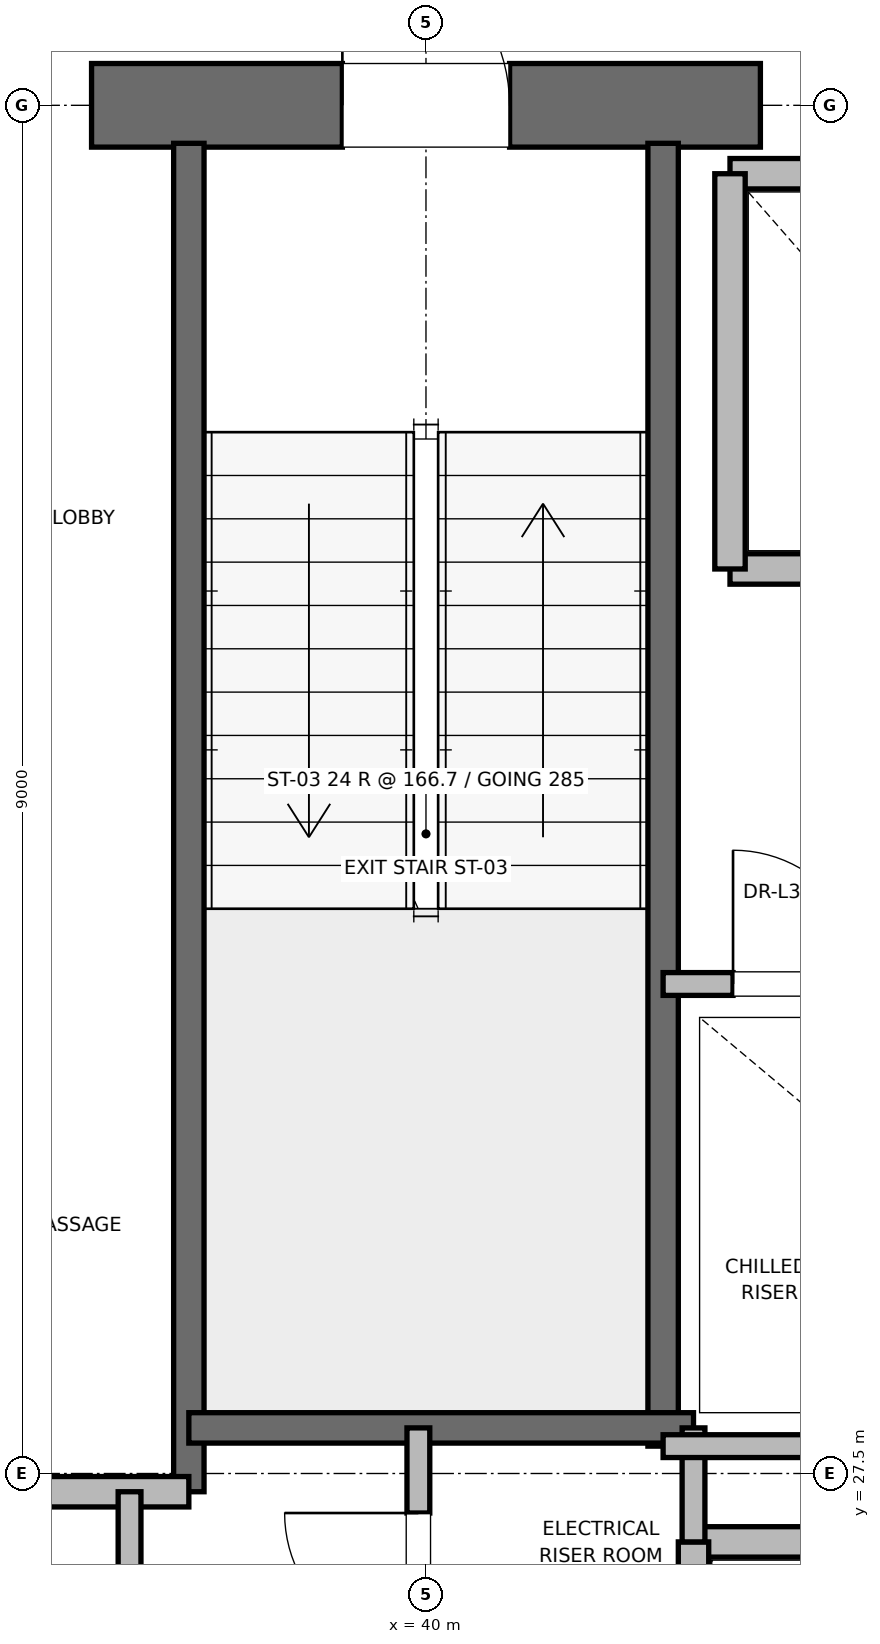
"""IFC4 building model, lengths in metres.
Left out: names, types, materials, properties, quantities, classifications, styles, units other than length and angle.
Written with IfcOpenShell. Run it as: python <this file> out.ifc"""

import sys

from ifc_helpers import new_model, si_unit, direction, frame, frame_2d, origin, place, context, subcontext, project, spatial, rectangle, extrude, element, fill, save


model = new_model("IFC4")
c1 = context("Model", 3, precision=1e-05, world=origin(), true_north=direction((0.0, 1.0)))
c2 = subcontext(c1, "Body", "Model", "MODEL_VIEW")
j1 = project(units=[si_unit("LENGTHUNIT", "METRE"), si_unit("PLANEANGLEUNIT", "RADIAN")], contexts=[c1])
p1 = place(None, origin())
s1 = spatial("IfcSite", under=j1, at=p1, CompositionType="ELEMENT")
p2 = place(p1, origin())
s2 = spatial("IfcBuilding", under=s1, at=p2, CompositionType="ELEMENT")
p3 = place(p2, frame((0.0, 0.0, 156.4)))
s3 = spatial("IfcBuildingStorey", under=s2, at=p3, CompositionType="ELEMENT", Elevation=156.4)
p4 = place(p3, frame((37.8, 36.5, 0.0), z_axis=(0.0, 0.0, 1.0), x_axis=(1.0, 0.0, 0.0)))
e1 = element("IfcWall", 1, at=p4, inside=s3, PredefinedType="SHEAR", context=c2, shape_type="SweptSolid", body=[
    extrude(rectangle(XDim=4.4, YDim=0.55, at=frame_2d((2.2, 0.0))), origin(), (0.0, 0.0, 1.0), 3.775),
])
p5 = place(p4, frame((1.65, 0.0, 0.0)))
e2 = element("IfcOpeningElement", 2, at=p5, cuts=e1, PredefinedType="OPENING", context=c2, shape_type="SweptSolid", body=[
    extrude(rectangle(XDim=1.1, YDim=2.15, at=frame_2d((0.55, 1.075))), frame((0.0, 0.275, 0.0), z_axis=(0.0, -1.0, 0.0), x_axis=(1.0, 0.0, 0.0)), (0.0, 0.0, 1.0), 0.55),
])
p6 = place(p3, frame((38.44, 27.38, 0.0), z_axis=(0.0, 0.0, 1.0), x_axis=(0.0, 1.0, 0.0)))
e3 = element("IfcWall", 3, at=p6, inside=s3, PredefinedType="SOLIDWALL", context=c2, shape_type="SweptSolid", body=[
    extrude(rectangle(XDim=8.87, YDim=0.2, at=frame_2d((4.435, 0.0))), origin(), (0.0, 0.0, 1.0), 3.775),
])
p7 = place(p3, frame((41.56, 27.68, 0.0), z_axis=(0.0, 0.0, 1.0), x_axis=(0.0, 1.0, 0.0)))
e4 = element("IfcWall", 4, at=p7, inside=s3, PredefinedType="SOLIDWALL", context=c2, shape_type="SweptSolid", body=[
    extrude(rectangle(XDim=8.57, YDim=0.2, at=frame_2d((4.285, 0.0))), origin(), (0.0, 0.0, 1.0), 3.775),
])
p8 = place(p3, frame((38.44, 27.8, 0.0), z_axis=(0.0, 0.0, 1.0), x_axis=(1.0, 0.0, 0.0)))
e5 = element("IfcWall", 5, at=p8, inside=s3, PredefinedType="SOLIDWALL", context=c2, shape_type="SweptSolid", body=[
    extrude(rectangle(XDim=3.32, YDim=0.2, at=frame_2d((1.66, 0.0))), origin(), (0.0, 0.0, 1.0), 3.775),
])
p9 = place(p3, frame((32.82, 27.38, 0.0), z_axis=(0.0, 0.0, 1.0), x_axis=(1.0, 0.0, 0.0)))
e6 = element("IfcWall", 6, at=p9, inside=s3, PredefinedType="PARTITIONING", context=c2, shape_type="SweptSolid", body=[
    extrude(rectangle(XDim=5.62, YDim=0.2, at=frame_2d((2.81, 0.0))), origin(), (0.0, 0.0, 1.0), 3.775),
])
p10 = place(p3, frame((43.44, 27.05, 0.0), z_axis=(0.0, 0.0, 1.0), x_axis=(-1.0, 0.0, 0.0)))
e7 = element("IfcWall", 7, at=p10, inside=s3, PredefinedType="SOLIDWALL", context=c2, shape_type="SweptSolid", body=[
    extrude(rectangle(XDim=1.68, YDim=0.2, at=frame_2d((0.84, 0.0))), origin(), (0.0, 0.0, 1.0), 3.775),
])
p11 = place(p3, frame((41.76, 27.05, 0.0), z_axis=(0.0, 0.0, 1.0), x_axis=(0.0, -1.0, 0.0)))
e8 = element("IfcWall", 8, at=p11, inside=s3, PredefinedType="SOLIDWALL", context=c2, shape_type="SweptSolid", body=[
    extrude(rectangle(XDim=2.6, YDim=0.2, at=frame_2d((1.3, 0.0))), origin(), (0.0, 0.0, 1.0), 3.775),
])
p12 = place(p3, frame((42.0, 33.45, 0.0), z_axis=(0.0, 0.0, 1.0), x_axis=(1.0, 0.0, 0.0)))
e9 = element("IfcWall", 9, at=p12, inside=s3, PredefinedType="SOLIDWALL", context=c2, shape_type="SweptSolid", body=[
    extrude(rectangle(XDim=2.3, YDim=0.2, at=frame_2d((1.15, 0.0))), origin(), (0.0, 0.0, 1.0), 3.775),
])
p13 = place(p3, frame((44.3, 36.05, 0.0), z_axis=(0.0, 0.0, 1.0), x_axis=(-1.0, 0.0, 0.0)))
e10 = element("IfcWall", 10, at=p13, inside=s3, PredefinedType="SOLIDWALL", context=c2, shape_type="SweptSolid", body=[
    extrude(rectangle(XDim=2.3, YDim=0.2, at=frame_2d((1.15, 0.0))), origin(), (0.0, 0.0, 1.0), 2.755),
])
p14 = place(p3, frame((42.0, 36.05, 0.0), z_axis=(0.0, 0.0, 1.0), x_axis=(0.0, -1.0, 0.0)))
e11 = element("IfcWall", 11, at=p14, inside=s3, PredefinedType="SOLIDWALL", context=c2, shape_type="SweptSolid", body=[
    extrude(rectangle(XDim=2.6, YDim=0.2, at=frame_2d((1.3, 0.0))), origin(), (0.0, 0.0, 1.0), 2.755),
])
p15 = place(p3, frame((41.76, 27.05, 0.0), z_axis=(0.0, 0.0, 1.0), x_axis=(0.0, 1.0, 0.0)))
e12 = element("IfcWall", 12, at=p15, inside=s3, PredefinedType="PARTITIONING", context=c2, shape_type="SweptSolid", body=[
    extrude(rectangle(XDim=0.75, YDim=0.15, at=frame_2d((0.375, 0.0))), origin(), (0.0, 0.0, 1.0), 2.85),
])
p16 = place(p3, frame((39.95, 25.8, 0.0), z_axis=(0.0, 0.0, 1.0), x_axis=(0.0, 1.0, 0.0)))
e13 = element("IfcWall", 13, at=p16, inside=s3, PredefinedType="PARTITIONING", context=c2, shape_type="SweptSolid", body=[
    extrude(rectangle(XDim=2.0, YDim=0.15, at=frame_2d((1.0, 0.0))), origin(), (0.0, 0.0, 1.0), 2.85),
])
p17 = place(p16, frame((0.56, 0.0, 0.0)))
e14 = element("IfcOpeningElement", 14, at=p17, cuts=e13, PredefinedType="OPENING", context=c2, shape_type="SweptSolid", body=[
    extrude(rectangle(XDim=0.88, YDim=2.1, at=frame_2d((0.44, 1.05))), frame((0.0, 0.075, 0.0), z_axis=(0.0, -1.0, 0.0), x_axis=(1.0, 0.0, 0.0)), (0.0, 0.0, 1.0), 0.15),
])
p18 = place(p3, frame((38.05, 23.06, 0.0), z_axis=(0.0, 0.0, 1.0), x_axis=(0.0, 1.0, 0.0)))
e15 = element("IfcWall", 15, at=p18, inside=s3, PredefinedType="PARTITIONING", context=c2, shape_type="SweptSolid", body=[
    extrude(rectangle(XDim=4.32, YDim=0.15, at=frame_2d((2.16, 0.0))), origin(), (0.0, 0.0, 1.0), 2.85),
])
p19 = place(p18, frame((1.66, 0.0, 0.0)))
e16 = element("IfcOpeningElement", 16, at=p19, cuts=e15, PredefinedType="OPENING", context=c2, shape_type="SweptSolid", body=[
    extrude(rectangle(XDim=1.0, YDim=2.15, at=frame_2d((0.5, 1.075))), frame((0.0, 0.075, 0.0), z_axis=(0.0, -1.0, 0.0), x_axis=(1.0, 0.0, 0.0)), (0.0, 0.0, 1.0), 0.15),
])
p20 = place(p3, frame((41.56, 27.68, 0.0), z_axis=(0.0, 0.0, 1.0), x_axis=(1.0, 0.0, 0.0)))
e17 = element("IfcWall", 17, at=p20, inside=s3, PredefinedType="PARTITIONING", context=c2, shape_type="SweptSolid", body=[
    extrude(rectangle(XDim=3.59, YDim=0.15, at=frame_2d((1.795, 0.0))), origin(), (0.0, 0.0, 1.0), 2.85),
])
p21 = place(p3, frame((41.56, 30.72, 0.0), z_axis=(0.0, 0.0, 1.0), x_axis=(1.0, 0.0, 0.0)))
e18 = element("IfcWall", 18, at=p21, inside=s3, PredefinedType="PARTITIONING", context=c2, shape_type="SweptSolid", body=[
    extrude(rectangle(XDim=1.8, YDim=0.15, at=frame_2d((0.9, 0.0))), origin(), (0.0, 0.0, 1.0), 2.85),
])
p22 = place(p21, frame((0.46, 0.0, 0.0)))
e19 = element("IfcOpeningElement", 19, at=p22, cuts=e18, PredefinedType="OPENING", context=c2, shape_type="SweptSolid", body=[
    extrude(rectangle(XDim=0.88, YDim=2.1, at=frame_2d((0.44, 1.05))), frame((0.0, 0.075, 0.0), z_axis=(0.0, -1.0, 0.0), x_axis=(1.0, 0.0, 0.0)), (0.0, 0.0, 1.0), 0.15),
])
p23 = place(p5, origin())
e20 = element("IfcDoor", 20, at=p23, inside=s3, OperationType="SINGLE_SWING_LEFT", PredefinedType="DOOR", context=c2, shape_type="SweptSolid", body=[
    extrude(rectangle(XDim=1.1, YDim=2.15, at=frame_2d((0.55, 1.075))), frame((0.0, 0.025, 0.0), z_axis=(0.0, -1.0, 0.0), x_axis=(1.0, 0.0, 0.0)), (0.0, 0.0, 1.0), 0.05),
])
fill(e2, e20)
p24 = place(p17, origin())
e21 = element("IfcDoor", 21, at=p24, inside=s3, OperationType="SINGLE_SWING_RIGHT", PredefinedType="DOOR", context=c2, shape_type="SweptSolid", body=[
    extrude(rectangle(XDim=0.88, YDim=2.1, at=frame_2d((0.44, 1.05))), frame((0.0, 0.025, 0.0), z_axis=(0.0, -1.0, 0.0), x_axis=(1.0, 0.0, 0.0)), (0.0, 0.0, 1.0), 0.05),
])
fill(e14, e21)
p25 = place(p22, origin())
e22 = element("IfcDoor", 22, at=p25, inside=s3, OperationType="SINGLE_SWING_LEFT", PredefinedType="DOOR", context=c2, shape_type="SweptSolid", body=[
    extrude(rectangle(XDim=0.88, YDim=2.1, at=frame_2d((0.44, 1.05))), frame((0.0, 0.025, 0.0), z_axis=(0.0, -1.0, 0.0), x_axis=(1.0, 0.0, 0.0)), (0.0, 0.0, 1.0), 0.05),
])
fill(e19, e22)
save(model, sys.argv[1])
